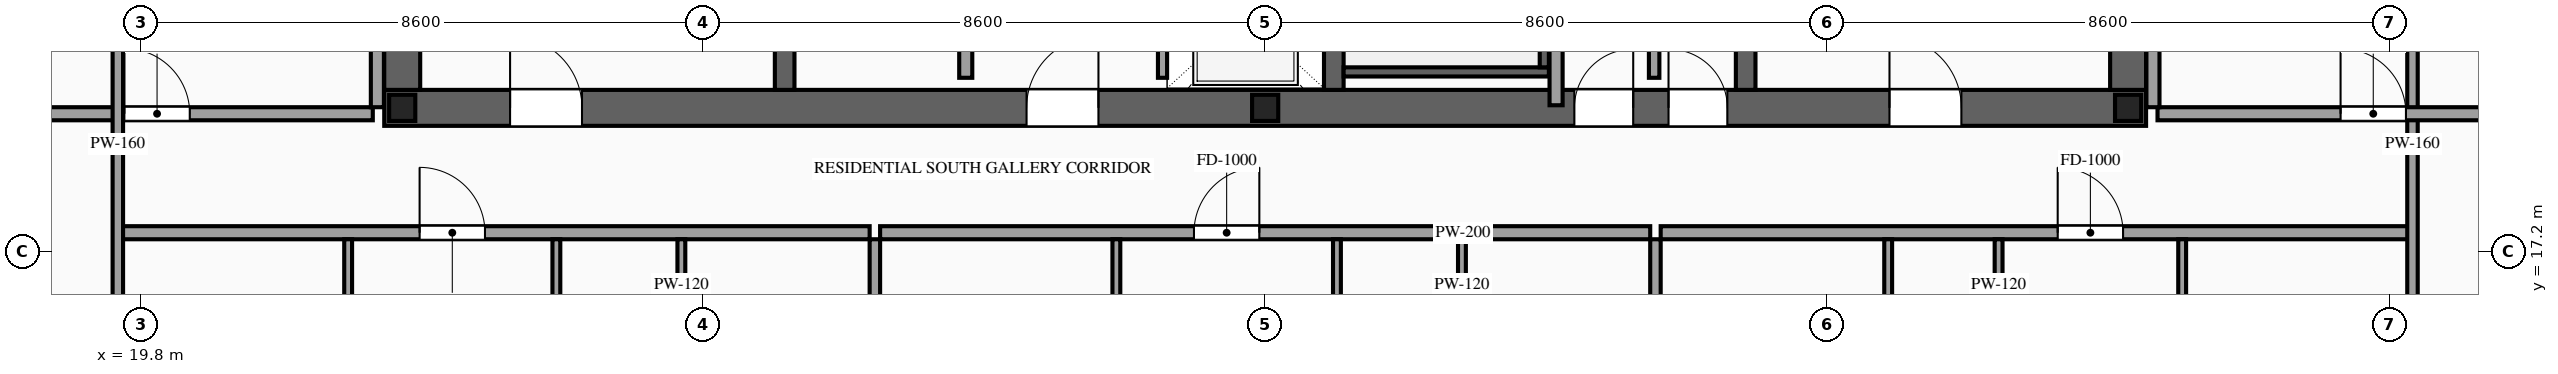
"""IFC4 building model, lengths in metres.
Left out: names, types, materials, properties, quantities, classifications, styles, units other than length and angle.
Written with IfcOpenShell. Run it as: python <this file> out.ifc"""

import sys

from ifc_helpers import new_model, si_unit, direction, frame, frame_2d, origin, origin_2d, place, context, subcontext, project, spatial, rectangle, i_section, extrude, source, transform, mapped, element, fill, save


model = new_model("IFC4")
c1 = context("Model", 3, precision=1e-05, world=origin(), true_north=direction((0.0, 1.0)))
c2 = subcontext(c1, "Body", "Model", "MODEL_VIEW")
j1 = project(units=[si_unit("LENGTHUNIT", "METRE"), si_unit("PLANEANGLEUNIT", "RADIAN")], contexts=[c1])
p1 = place(None, origin())
s1 = spatial("IfcSite", under=j1, at=p1, CompositionType="ELEMENT")
p2 = place(p1, origin())
s2 = spatial("IfcBuilding", under=s1, at=p2, CompositionType="ELEMENT")
p3 = place(p2, frame((0.0, 0.0, 245.1)))
s3 = spatial("IfcBuildingStorey", under=s2, at=p3, CompositionType="ELEMENT", Elevation=245.1)
p4 = place(p3, frame((23.525, 19.4, 0.0), z_axis=(0.0, 0.0, 1.0), x_axis=(1.0, 0.0, 0.0)))
e1 = element("IfcWall", 1, at=p4, inside=s3, PredefinedType="SHEAR", context=c2, shape_type="SweptSolid", body=[
    extrude(rectangle(XDim=26.95, YDim=0.55, at=frame_2d((13.475, 0.0))), origin(), (0.0, 0.0, 1.0), 3.5),
])
p5 = place(p4, frame((1.925, 0.0, 0.0)))
e2 = element("IfcOpeningElement", 2, at=p5, cuts=e1, PredefinedType="OPENING", context=c2, shape_type="SweptSolid", body=[
    extrude(rectangle(XDim=1.1, YDim=2.2, at=frame_2d((0.55, 1.1))), frame((0.0, 0.29, 0.0), z_axis=(0.0, -1.0, 0.0), x_axis=(1.0, 0.0, 0.0)), (0.0, 0.0, 1.0), 0.58),
])
p6 = place(p4, frame((9.825, 0.0, 0.0)))
e3 = element("IfcOpeningElement", 3, at=p6, cuts=e1, PredefinedType="OPENING", context=c2, shape_type="SweptSolid", body=[
    extrude(rectangle(XDim=1.1, YDim=2.2, at=frame_2d((0.55, 1.1))), frame((0.0, 0.29, 0.0), z_axis=(0.0, -1.0, 0.0), x_axis=(1.0, 0.0, 0.0)), (0.0, 0.0, 1.0), 0.58),
])
p7 = place(p4, frame((23.025, 0.0, 0.0)))
e4 = element("IfcOpeningElement", 4, at=p7, cuts=e1, PredefinedType="OPENING", context=c2, shape_type="SweptSolid", body=[
    extrude(rectangle(XDim=1.1, YDim=2.2, at=frame_2d((0.55, 1.1))), frame((0.0, 0.29, 0.0), z_axis=(0.0, -1.0, 0.0), x_axis=(1.0, 0.0, 0.0)), (0.0, 0.0, 1.0), 0.58),
])
p8 = place(p4, frame((19.645, 0.0, 0.0)))
e5 = element("IfcOpeningElement", 5, at=p8, cuts=e1, PredefinedType="OPENING", context=c2, shape_type="SweptSolid", body=[
    extrude(rectangle(XDim=0.9, YDim=2.15, at=frame_2d((0.45, 1.075))), frame((0.0, 0.29, 0.0), z_axis=(0.0, -1.0, 0.0), x_axis=(1.0, 0.0, 0.0)), (0.0, 0.0, 1.0), 0.58),
])
p9 = place(p4, frame((18.205, 0.0, 0.0)))
e6 = element("IfcOpeningElement", 6, at=p9, cuts=e1, PredefinedType="OPENING", context=c2, shape_type="SweptSolid", body=[
    extrude(rectangle(XDim=0.9, YDim=2.15, at=frame_2d((0.45, 1.075))), frame((0.0, 0.29, 0.0), z_axis=(0.0, -1.0, 0.0), x_axis=(1.0, 0.0, 0.0)), (0.0, 0.0, 1.0), 0.58),
])
m1 = source(origin(), c2, "Body", "SweptSolid", [
    extrude(rectangle(XDim=12.25, YDim=0.55, at=frame_2d((6.125, 0.0))), origin(), (0.0, 0.0, 1.0), 3.5),
])
for number, where, z_axis, x_axis in (
    (7, (23.8, 19.675, 0.0), (0.0, 0.0, 1.0), (0.0, 1.0, 0.0)),
    (8, (50.2, 19.675, 0.0), (0.0, 0.0, 1.0), (0.0, 1.0, 0.0)),
):
    element("IfcWall", number, at=place(p3, frame(where, z_axis=z_axis, x_axis=x_axis)), inside=s3, PredefinedType="SHEAR", context=c2, shape_type="MappedRepresentation", body=[
        mapped(m1, transform((0.0, 0.0, 0.0), scale=1.0)),
    ])
m2 = source(origin(), c2, "Body", "SweptSolid", [
    extrude(rectangle(XDim=12.25, YDim=0.3, at=frame_2d((6.125, 0.0))), origin(), (0.0, 0.0, 1.0), 3.5),
])
for number, where, z_axis, x_axis in (
    (9, (29.65, 19.675, 0.0), (0.0, 0.0, 1.0), (0.0, 1.0, 0.0)),
    (10, (38.05, 19.675, 0.0), (0.0, 0.0, 1.0), (0.0, 1.0, 0.0)),
    (11, (44.35, 19.675, 0.0), (0.0, 0.0, 1.0), (0.0, 1.0, 0.0)),
):
    element("IfcWall", number, at=place(p3, frame(where, z_axis=z_axis, x_axis=x_axis)), inside=s3, PredefinedType="SOLIDWALL", context=c2, shape_type="MappedRepresentation", body=[
        mapped(m2, transform((0.0, 0.0, 0.0), scale=1.0)),
    ])
m3 = source(origin(), c2, "Body", "SweptSolid", [
    extrude(i_section(OverallWidth=0.4, OverallDepth=0.4, WebThickness=0.013, FlangeThickness=0.021, at=origin_2d()), origin(), (0.0, 0.0, 1.0), 3.5),
])
for number, where, z_axis, x_axis in (
    (12, (23.8, 19.4, 0.0), (0.0, 0.0, 1.0), (1.0, 0.0, 0.0)),
    (13, (37.0, 19.4, 0.0), (0.0, 0.0, 1.0), (1.0, 0.0, 0.0)),
    (14, (50.2, 19.4, 0.0), (0.0, 0.0, 1.0), (1.0, 0.0, 0.0)),
):
    element("IfcColumn", number, at=place(p3, frame(where, z_axis=z_axis, x_axis=x_axis)), inside=s3, PredefinedType="COLUMN", context=c2, shape_type="MappedRepresentation", body=[
        mapped(m3, transform((0.0, 0.0, 0.0), scale=1.0)),
    ])
p10 = place(p3, frame((35.43, 19.86, 0.0), z_axis=(0.0, 0.0, 1.0), x_axis=(0.0, 1.0, 0.0)))
e15 = element("IfcWall", 15, at=p10, inside=s3, PredefinedType="SOLIDWALL", context=c2, shape_type="SweptSolid", body=[
    extrude(rectangle(XDim=2.04, YDim=0.14, at=frame_2d((1.02, 0.0))), origin(), (0.0, 0.0, 1.0), 3.28),
])
p11 = place(p10, frame((0.47, 0.0, 0.0)))
e16 = element("IfcOpeningElement", 16, at=p11, cuts=e15, PredefinedType="OPENING", context=c2, shape_type="SweptSolid", body=[
    extrude(rectangle(XDim=1.1, YDim=2.2, at=frame_2d((0.55, 1.1))), frame((0.0, 0.085, 0.0), z_axis=(0.0, -1.0, 0.0), x_axis=(1.0, 0.0, 0.0)), (0.0, 0.0, 1.0), 0.17),
])
m4 = source(origin(), c2, "Body", "SweptSolid", [
    extrude(rectangle(XDim=3.14, YDim=0.14, at=frame_2d((1.57, 0.0))), origin(), (0.0, 0.0, 1.0), 3.28),
])
p12 = place(p3, frame((38.2, 19.95, 0.0), z_axis=(0.0, 0.0, 1.0), x_axis=(1.0, 0.0, 0.0)))
e17 = element("IfcWall", 17, at=p12, inside=s3, PredefinedType="SOLIDWALL", context=c2, shape_type="MappedRepresentation", body=[
    mapped(m4, transform((0.0, 0.0, 0.0), scale=1.0)),
])
m5 = source(origin(), c2, "Body", "SweptSolid", [
    extrude(rectangle(XDim=8.94, YDim=0.14, at=frame_2d((4.47, 0.0))), origin(), (0.0, 0.0, 1.0), 3.28),
])
p13 = place(p3, frame((41.27, 20.02, 0.0), z_axis=(0.0, 0.0, 1.0), x_axis=(0.0, 1.0, 0.0)))
e18 = element("IfcWall", 18, at=p13, inside=s3, PredefinedType="SOLIDWALL", context=c2, shape_type="MappedRepresentation", body=[
    mapped(m5, transform((0.0, 0.0, 0.0), scale=1.0)),
])
p14 = place(p3, frame((32.42, 19.86, 0.0), z_axis=(0.0, 0.0, 1.0), x_axis=(0.0, 1.0, 0.0)))
e19 = element("IfcWall", 19, at=p14, inside=s3, PredefinedType="PARTITIONING", context=c2, shape_type="SweptSolid", body=[
    extrude(rectangle(XDim=11.88, YDim=0.2, at=frame_2d((5.94, 0.0))), origin(), (0.0, 0.0, 1.0), 3.28),
])
p15 = place(p14, frame((5.49, 0.0, 0.0)))
e20 = element("IfcOpeningElement", 20, at=p15, cuts=e19, PredefinedType="OPENING", context=c2, shape_type="SweptSolid", body=[
    extrude(rectangle(XDim=0.9, YDim=2.15, at=frame_2d((0.45, 1.075))), frame((0.0, 0.115, 0.0), z_axis=(0.0, -1.0, 0.0), x_axis=(1.0, 0.0, 0.0)), (0.0, 0.0, 1.0), 0.23),
])
m6 = source(origin(), c2, "Body", "SweptSolid", [
    extrude(rectangle(XDim=1.34, YDim=0.16, at=frame_2d((0.67, 0.0))), origin(), (0.0, 0.0, 1.0), 3.28),
])
p16 = place(p3, frame((42.95, 19.86, 0.0), z_axis=(0.0, 0.0, 1.0), x_axis=(0.0, 1.0, 0.0)))
e21 = element("IfcWall", 21, at=p16, inside=s3, PredefinedType="PARTITIONING", context=c2, shape_type="MappedRepresentation", body=[
    mapped(m6, transform((0.0, 0.0, 0.0), scale=1.0)),
])
m7 = source(origin(), c2, "Body", "SweptSolid", [
    extrude(rectangle(XDim=12.72, YDim=0.2, at=frame_2d((6.36, 0.0))), origin(), (0.0, 0.0, 1.0), 3.28),
])
p17 = place(p3, frame((41.45, 19.44, 0.0), z_axis=(0.0, 0.0, 1.0), x_axis=(0.0, 1.0, 0.0)))
e22 = element("IfcWall", 22, at=p17, inside=s3, PredefinedType="PARTITIONING", context=c2, shape_type="MappedRepresentation", body=[
    mapped(m7, transform((0.0, 0.0, 0.0), scale=1.0)),
])
p18 = place(p3, frame((19.44, 17.49, 0.0), z_axis=(0.0, 0.0, 1.0), x_axis=(1.0, 0.0, 0.0)))
e23 = element("IfcWall", 23, at=p18, inside=s3, PredefinedType="PARTITIONING", context=c2, shape_type="SweptSolid", body=[
    extrude(rectangle(XDim=11.51, YDim=0.2, at=frame_2d((5.755, 0.0))), origin(), (0.0, 0.0, 1.0), 3.28),
])
p19 = place(p18, frame((4.626, 0.0, 0.0)))
e24 = element("IfcOpeningElement", 24, at=p19, cuts=e23, PredefinedType="OPENING", context=c2, shape_type="SweptSolid", body=[
    extrude(rectangle(XDim=1.0, YDim=2.2, at=frame_2d((0.5, 1.1))), frame((0.0, 0.115, 0.0), z_axis=(0.0, -1.0, 0.0), x_axis=(1.0, 0.0, 0.0)), (0.0, 0.0, 1.0), 0.23),
])
m8 = source(origin(), c2, "Body", "SweptSolid", [
    extrude(rectangle(XDim=12.04, YDim=0.16, at=frame_2d((6.02, 0.0))), origin(), (0.0, 0.0, 1.0), 3.28),
])
p20 = place(p3, frame((31.03, 5.35, 0.0), z_axis=(0.0, 0.0, 1.0), x_axis=(0.0, 1.0, 0.0)))
e25 = element("IfcWall", 25, at=p20, inside=s3, PredefinedType="PARTITIONING", context=c2, shape_type="MappedRepresentation", body=[
    mapped(m8, transform((0.0, 0.0, 0.0), scale=1.0)),
])
m9 = source(origin(), c2, "Body", "SweptSolid", [
    extrude(rectangle(XDim=4.11, YDim=0.12, at=frame_2d((2.055, 0.0))), origin(), (0.0, 0.0, 1.0), 3.28),
])
p21 = place(p3, frame((22.973, 13.28, 0.0), z_axis=(0.0, 0.0, 1.0), x_axis=(0.0, 1.0, 0.0)))
e26 = element("IfcWall", 26, at=p21, inside=s3, PredefinedType="PARTITIONING", context=c2, shape_type="MappedRepresentation", body=[
    mapped(m9, transform((0.0, 0.0, 0.0), scale=1.0)),
])
p22 = place(p3, frame((28.07, 13.28, 0.0), z_axis=(0.0, 0.0, 1.0), x_axis=(0.0, 1.0, 0.0)))
e27 = element("IfcWall", 27, at=p22, inside=s3, PredefinedType="PARTITIONING", context=c2, shape_type="SweptSolid", body=[
    extrude(rectangle(XDim=4.11, YDim=0.12, at=frame_2d((2.055, 0.0))), origin(), (0.0, 0.0, 1.0), 3.28),
])
p23 = place(p22, frame((1.63, 0.0, 0.0)))
e28 = element("IfcOpeningElement", 28, at=p23, cuts=e27, PredefinedType="OPENING", context=c2, shape_type="SweptSolid", body=[
    extrude(rectangle(XDim=0.85, YDim=2.1, at=frame_2d((0.425, 1.05))), frame((0.0, 0.075, 0.0), z_axis=(0.0, -1.0, 0.0), x_axis=(1.0, 0.0, 0.0)), (0.0, 0.0, 1.0), 0.15),
])
p24 = place(p3, frame((26.158, 13.28, 0.0), z_axis=(0.0, 0.0, 1.0), x_axis=(0.0, 1.0, 0.0)))
e29 = element("IfcWall", 29, at=p24, inside=s3, PredefinedType="PARTITIONING", context=c2, shape_type="SweptSolid", body=[
    extrude(rectangle(XDim=4.11, YDim=0.12, at=frame_2d((2.055, 0.0))), origin(), (0.0, 0.0, 1.0), 3.28),
])
p25 = place(p24, frame((1.63, 0.0, 0.0)))
e30 = element("IfcOpeningElement", 30, at=p25, cuts=e29, PredefinedType="OPENING", context=c2, shape_type="SweptSolid", body=[
    extrude(rectangle(XDim=0.85, YDim=2.1, at=frame_2d((0.425, 1.05))), frame((0.0, 0.075, 0.0), z_axis=(0.0, -1.0, 0.0), x_axis=(1.0, 0.0, 0.0)), (0.0, 0.0, 1.0), 0.15),
])
p26 = place(p3, frame((31.11, 17.49, 0.0), z_axis=(0.0, 0.0, 1.0), x_axis=(1.0, 0.0, 0.0)))
e31 = element("IfcWall", 31, at=p26, inside=s3, PredefinedType="PARTITIONING", context=c2, shape_type="SweptSolid", body=[
    extrude(rectangle(XDim=11.78, YDim=0.2, at=frame_2d((5.89, 0.0))), origin(), (0.0, 0.0, 1.0), 3.28),
])
p27 = place(p26, frame((4.801, 0.0, 0.0)))
e32 = element("IfcOpeningElement", 32, at=p27, cuts=e31, PredefinedType="OPENING", context=c2, shape_type="SweptSolid", body=[
    extrude(rectangle(XDim=1.0, YDim=2.2, at=frame_2d((0.5, 1.1))), frame((0.0, 0.115, 0.0), z_axis=(0.0, -1.0, 0.0), x_axis=(1.0, 0.0, 0.0)), (0.0, 0.0, 1.0), 0.23),
])
p28 = place(p3, frame((42.97, 5.35, 0.0), z_axis=(0.0, 0.0, 1.0), x_axis=(0.0, 1.0, 0.0)))
e33 = element("IfcWall", 33, at=p28, inside=s3, PredefinedType="PARTITIONING", context=c2, shape_type="MappedRepresentation", body=[
    mapped(m8, transform((0.0, 0.0, 0.0), scale=1.0)),
])
p29 = place(p3, frame((34.724, 13.28, 0.0), z_axis=(0.0, 0.0, 1.0), x_axis=(0.0, 1.0, 0.0)))
e34 = element("IfcWall", 34, at=p29, inside=s3, PredefinedType="PARTITIONING", context=c2, shape_type="MappedRepresentation", body=[
    mapped(m9, transform((0.0, 0.0, 0.0), scale=1.0)),
])
p30 = place(p3, frame((40.01, 13.28, 0.0), z_axis=(0.0, 0.0, 1.0), x_axis=(0.0, 1.0, 0.0)))
e35 = element("IfcWall", 35, at=p30, inside=s3, PredefinedType="PARTITIONING", context=c2, shape_type="SweptSolid", body=[
    extrude(rectangle(XDim=4.11, YDim=0.12, at=frame_2d((2.055, 0.0))), origin(), (0.0, 0.0, 1.0), 3.28),
])
p31 = place(p30, frame((1.63, 0.0, 0.0)))
e36 = element("IfcOpeningElement", 36, at=p31, cuts=e35, PredefinedType="OPENING", context=c2, shape_type="SweptSolid", body=[
    extrude(rectangle(XDim=0.85, YDim=2.1, at=frame_2d((0.425, 1.05))), frame((0.0, 0.075, 0.0), z_axis=(0.0, -1.0, 0.0), x_axis=(1.0, 0.0, 0.0)), (0.0, 0.0, 1.0), 0.15),
])
p32 = place(p3, frame((38.098, 13.28, 0.0), z_axis=(0.0, 0.0, 1.0), x_axis=(0.0, 1.0, 0.0)))
e37 = element("IfcWall", 37, at=p32, inside=s3, PredefinedType="PARTITIONING", context=c2, shape_type="SweptSolid", body=[
    extrude(rectangle(XDim=4.11, YDim=0.12, at=frame_2d((2.055, 0.0))), origin(), (0.0, 0.0, 1.0), 3.28),
])
p33 = place(p32, frame((1.63, 0.0, 0.0)))
e38 = element("IfcOpeningElement", 38, at=p33, cuts=e37, PredefinedType="OPENING", context=c2, shape_type="SweptSolid", body=[
    extrude(rectangle(XDim=0.85, YDim=2.1, at=frame_2d((0.425, 1.05))), frame((0.0, 0.075, 0.0), z_axis=(0.0, -1.0, 0.0), x_axis=(1.0, 0.0, 0.0)), (0.0, 0.0, 1.0), 0.15),
])
p34 = place(p3, frame((43.05, 17.49, 0.0), z_axis=(0.0, 0.0, 1.0), x_axis=(1.0, 0.0, 0.0)))
e39 = element("IfcWall", 39, at=p34, inside=s3, PredefinedType="PARTITIONING", context=c2, shape_type="SweptSolid", body=[
    extrude(rectangle(XDim=11.51, YDim=0.2, at=frame_2d((5.755, 0.0))), origin(), (0.0, 0.0, 1.0), 3.28),
])
p35 = place(p34, frame((6.073, 0.0, 0.0)))
e40 = element("IfcOpeningElement", 40, at=p35, cuts=e39, PredefinedType="OPENING", context=c2, shape_type="SweptSolid", body=[
    extrude(rectangle(XDim=1.0, YDim=2.2, at=frame_2d((0.5, 1.1))), frame((0.0, 0.115, 0.0), z_axis=(0.0, -1.0, 0.0), x_axis=(1.0, 0.0, 0.0)), (0.0, 0.0, 1.0), 0.23),
])
p36 = place(p3, frame((46.53, 13.28, 0.0), z_axis=(0.0, 0.0, 1.0), x_axis=(0.0, 1.0, 0.0)))
e41 = element("IfcWall", 41, at=p36, inside=s3, PredefinedType="PARTITIONING", context=c2, shape_type="MappedRepresentation", body=[
    mapped(m9, transform((0.0, 0.0, 0.0), scale=1.0)),
])
p37 = place(p3, frame((48.219, 13.28, 0.0), z_axis=(0.0, 0.0, 1.0), x_axis=(0.0, 1.0, 0.0)))
e42 = element("IfcWall", 42, at=p37, inside=s3, PredefinedType="PARTITIONING", context=c2, shape_type="SweptSolid", body=[
    extrude(rectangle(XDim=4.11, YDim=0.12, at=frame_2d((2.055, 0.0))), origin(), (0.0, 0.0, 1.0), 3.28),
])
p38 = place(p37, frame((1.63, 0.0, 0.0)))
e43 = element("IfcOpeningElement", 43, at=p38, cuts=e42, PredefinedType="OPENING", context=c2, shape_type="SweptSolid", body=[
    extrude(rectangle(XDim=0.85, YDim=2.1, at=frame_2d((0.425, 1.05))), frame((0.0, 0.075, 0.0), z_axis=(0.0, -1.0, 0.0), x_axis=(1.0, 0.0, 0.0)), (0.0, 0.0, 1.0), 0.15),
])
p39 = place(p3, frame((51.027, 13.28, 0.0), z_axis=(0.0, 0.0, 1.0), x_axis=(0.0, 1.0, 0.0)))
e44 = element("IfcWall", 44, at=p39, inside=s3, PredefinedType="PARTITIONING", context=c2, shape_type="MappedRepresentation", body=[
    mapped(m9, transform((0.0, 0.0, 0.0), scale=1.0)),
])
p40 = place(p3, frame((16.55, 19.31, 0.0), z_axis=(0.0, 0.0, 1.0), x_axis=(1.0, 0.0, 0.0)))
e45 = element("IfcWall", 45, at=p40, inside=s3, PredefinedType="PARTITIONING", context=c2, shape_type="SweptSolid", body=[
    extrude(rectangle(XDim=6.8, YDim=0.2, at=frame_2d((3.4, 0.0))), origin(), (0.0, 0.0, 1.0), 2.825),
])
p41 = place(p40, frame((3.0, 0.0, 0.0)))
e46 = element("IfcOpeningElement", 46, at=p41, cuts=e45, PredefinedType="OPENING", context=c2, shape_type="SweptSolid", body=[
    extrude(rectangle(XDim=1.0, YDim=2.2, at=frame_2d((0.5, 1.1))), frame((0.0, 0.115, 0.0), z_axis=(0.0, -1.0, 0.0), x_axis=(1.0, 0.0, 0.0)), (0.0, 0.0, 1.0), 0.23),
])
m10 = source(origin(), c2, "Body", "SweptSolid", [
    extrude(rectangle(XDim=6.29, YDim=0.2, at=frame_2d((3.145, 0.0))), origin(), (0.0, 0.0, 1.0), 3.28),
])
p42 = place(p3, frame((23.42, 19.41, 0.0), z_axis=(0.0, 0.0, 1.0), x_axis=(0.0, 1.0, 0.0)))
e47 = element("IfcWall", 47, at=p42, inside=s3, PredefinedType="PARTITIONING", context=c2, shape_type="MappedRepresentation", body=[
    mapped(m10, transform((0.0, 0.0, 0.0), scale=1.0)),
])
m11 = source(origin(), c2, "Body", "SweptSolid", [
    extrude(rectangle(XDim=26.69, YDim=0.16, at=frame_2d((13.345, 0.0))), origin(), (0.0, 0.0, 1.0), 3.28),
])
for number, where, z_axis, x_axis in (
    (48, (19.45, 5.5, 0.0), (0.0, 0.0, 1.0), (0.0, 1.0, 0.0)),
    (49, (54.55, 5.5, 0.0), (0.0, 0.0, 1.0), (0.0, 1.0, 0.0)),
):
    element("IfcWall", number, at=place(p3, frame(where, z_axis=z_axis, x_axis=x_axis)), inside=s3, PredefinedType="PARTITIONING", context=c2, shape_type="MappedRepresentation", body=[
        mapped(m11, transform((0.0, 0.0, 0.0), scale=1.0)),
    ])
p43 = place(p3, frame((50.65, 19.31, 0.0), z_axis=(0.0, 0.0, 1.0), x_axis=(1.0, 0.0, 0.0)))
e50 = element("IfcWall", 50, at=p43, inside=s3, PredefinedType="PARTITIONING", context=c2, shape_type="SweptSolid", body=[
    extrude(rectangle(XDim=6.8, YDim=0.2, at=frame_2d((3.4, 0.0))), origin(), (0.0, 0.0, 1.0), 2.825),
])
p44 = place(p43, frame((2.8, 0.0, 0.0)))
e51 = element("IfcOpeningElement", 51, at=p44, cuts=e50, PredefinedType="OPENING", context=c2, shape_type="SweptSolid", body=[
    extrude(rectangle(XDim=1.0, YDim=2.2, at=frame_2d((0.5, 1.1))), frame((0.0, 0.115, 0.0), z_axis=(0.0, -1.0, 0.0), x_axis=(1.0, 0.0, 0.0)), (0.0, 0.0, 1.0), 0.23),
])
p45 = place(p3, frame((50.58, 19.41, 0.0), z_axis=(0.0, 0.0, 1.0), x_axis=(0.0, 1.0, 0.0)))
e52 = element("IfcWall", 52, at=p45, inside=s3, PredefinedType="PARTITIONING", context=c2, shape_type="MappedRepresentation", body=[
    mapped(m10, transform((0.0, 0.0, 0.0), scale=1.0)),
])
m12 = source(origin(), c2, "Body", "SweptSolid", [
    extrude(rectangle(XDim=1.1, YDim=2.2, at=frame_2d((0.55, 1.1))), frame((0.0, 0.025, 0.0), z_axis=(0.0, -1.0, 0.0), x_axis=(1.0, 0.0, 0.0)), (0.0, 0.0, 1.0), 0.05),
])
p46 = place(p5, origin())
e53 = element("IfcDoor", 53, at=p46, inside=s3, OperationType="SINGLE_SWING_LEFT", PredefinedType="DOOR", context=c2, shape_type="MappedRepresentation", body=[
    mapped(m12, transform((0.0, 0.0, 0.0), scale=1.0)),
])
fill(e2, e53)
p47 = place(p6, origin())
e54 = element("IfcDoor", 54, at=p47, inside=s3, OperationType="SINGLE_SWING_RIGHT", PredefinedType="DOOR", context=c2, shape_type="MappedRepresentation", body=[
    mapped(m12, transform((0.0, 0.0, 0.0), scale=1.0)),
])
fill(e3, e54)
p48 = place(p7, origin())
e55 = element("IfcDoor", 55, at=p48, inside=s3, OperationType="SINGLE_SWING_LEFT", PredefinedType="DOOR", context=c2, shape_type="MappedRepresentation", body=[
    mapped(m12, transform((0.0, 0.0, 0.0), scale=1.0)),
])
fill(e4, e55)
m13 = source(origin(), c2, "Body", "SweptSolid", [
    extrude(rectangle(XDim=0.9, YDim=2.15, at=frame_2d((0.45, 1.075))), frame((0.0, 0.025, 0.0), z_axis=(0.0, -1.0, 0.0), x_axis=(1.0, 0.0, 0.0)), (0.0, 0.0, 1.0), 0.05),
])
p49 = place(p8, origin())
e56 = element("IfcDoor", 56, at=p49, inside=s3, OperationType="SINGLE_SWING_LEFT", PredefinedType="DOOR", context=c2, shape_type="MappedRepresentation", body=[
    mapped(m13, transform((0.0, 0.0, 0.0), scale=1.0)),
])
fill(e5, e56)
p50 = place(p9, origin())
e57 = element("IfcDoor", 57, at=p50, inside=s3, OperationType="SINGLE_SWING_RIGHT", PredefinedType="DOOR", context=c2, shape_type="MappedRepresentation", body=[
    mapped(m13, transform((0.0, 0.0, 0.0), scale=1.0)),
])
fill(e6, e57)
m14 = source(origin(), c2, "Body", "SweptSolid", [
    extrude(rectangle(XDim=1.0, YDim=2.2, at=frame_2d((0.5, 1.1))), frame((0.0, 0.025, 0.0), z_axis=(0.0, -1.0, 0.0), x_axis=(1.0, 0.0, 0.0)), (0.0, 0.0, 1.0), 0.05),
])
p51 = place(p19, origin())
e58 = element("IfcDoor", 58, at=p51, inside=s3, OperationType="SINGLE_SWING_LEFT", PredefinedType="DOOR", context=c2, shape_type="MappedRepresentation", body=[
    mapped(m14, transform((0.0, 0.0, 0.0), scale=1.0)),
])
fill(e24, e58)
p52 = place(p27, origin())
e59 = element("IfcDoor", 59, at=p52, inside=s3, OperationType="SINGLE_SWING_RIGHT", PredefinedType="DOOR", context=c2, shape_type="MappedRepresentation", body=[
    mapped(m14, transform((0.0, 0.0, 0.0), scale=1.0)),
])
fill(e32, e59)
p53 = place(p35, origin())
e60 = element("IfcDoor", 60, at=p53, inside=s3, OperationType="SINGLE_SWING_LEFT", PredefinedType="DOOR", context=c2, shape_type="MappedRepresentation", body=[
    mapped(m14, transform((0.0, 0.0, 0.0), scale=1.0)),
])
fill(e40, e60)
p54 = place(p41, origin())
e61 = element("IfcDoor", 61, at=p54, inside=s3, OperationType="SINGLE_SWING_LEFT", PredefinedType="DOOR", context=c2, shape_type="MappedRepresentation", body=[
    mapped(m14, transform((0.0, 0.0, 0.0), scale=1.0)),
])
fill(e46, e61)
p55 = place(p44, origin())
e62 = element("IfcDoor", 62, at=p55, inside=s3, OperationType="SINGLE_SWING_LEFT", PredefinedType="DOOR", context=c2, shape_type="MappedRepresentation", body=[
    mapped(m14, transform((0.0, 0.0, 0.0), scale=1.0)),
])
fill(e51, e62)
save(model, sys.argv[1])
